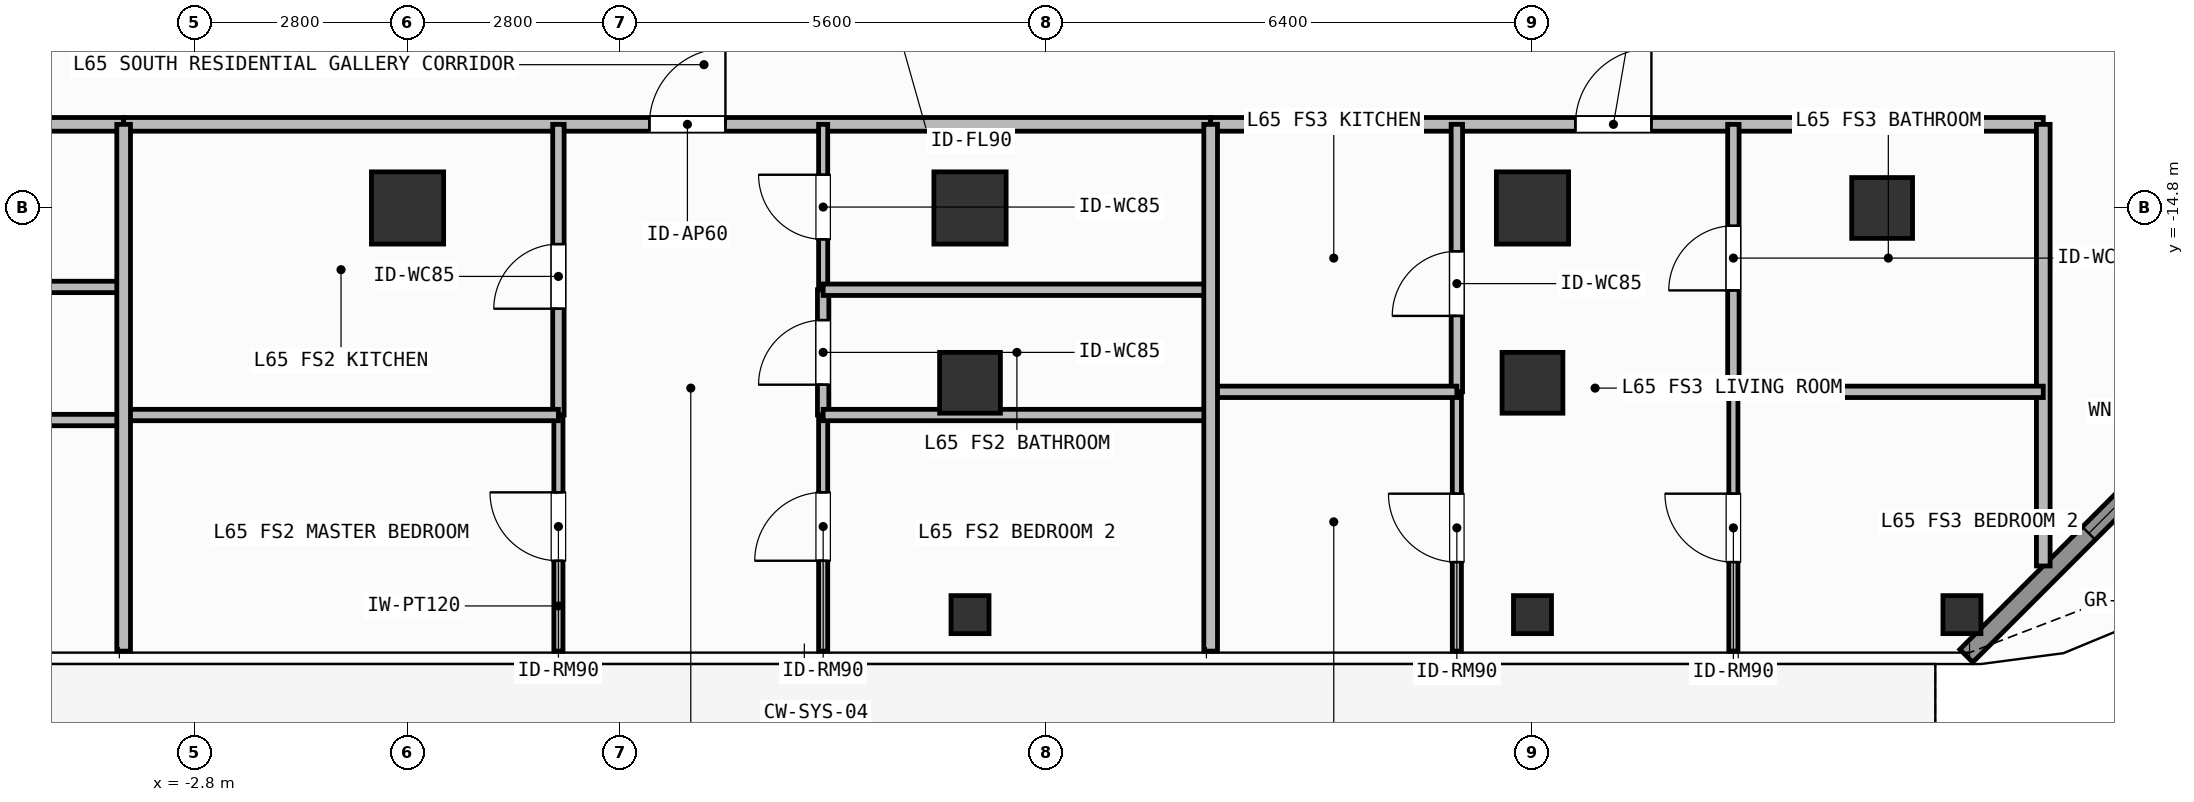
"""IFC4 building model, lengths in metres.
Left out: names, types, materials, properties, quantities, classifications, styles, units other than length and angle.
Written with IfcOpenShell. Run it as: python <this file> out.ifc"""

import sys

from ifc_helpers import new_model, si_unit, direction, frame, frame_2d, origin, origin_2d, place, context, subcontext, project, spatial, rectangle, hollow_rectangle, extrude, element, fill, save


model = new_model("IFC4")
c1 = context("Model", 3, precision=1e-05, world=origin(), true_north=direction((0.0, 1.0)))
c2 = subcontext(c1, "Body", "Model", "MODEL_VIEW")
j1 = project(units=[si_unit("LENGTHUNIT", "METRE"), si_unit("PLANEANGLEUNIT", "RADIAN")], contexts=[c1])
p1 = place(None, origin())
s1 = spatial("IfcSite", under=j1, at=p1, CompositionType="ELEMENT")
p2 = place(p1, origin())
s2 = spatial("IfcBuilding", under=s1, at=p2, CompositionType="ELEMENT")
p3 = place(p2, frame((0.0, 0.0, 266.4)))
s3 = spatial("IfcBuildingStorey", under=s2, at=p3, CompositionType="ELEMENT", Elevation=266.4)
for number, where, z_axis, x_axis in (
    (1, (0.0, -14.8, 0.0), (0.0, 0.0, 1.0), (1.0, 0.0, 0.0)),
    (2, (7.4, -14.8, 0.0), (0.0, 0.0, 1.0), (1.0, 0.0, 0.0)),
    (3, (14.8, -14.8, 0.0), (0.0, 0.0, 1.0), (1.0, 0.0, 0.0)),
):
    element("IfcColumn", number, at=place(p3, frame(where, z_axis=z_axis, x_axis=x_axis)), inside=s3, PredefinedType="COLUMN", context=c2, shape_type="SweptSolid", body=[
        extrude(rectangle(XDim=0.95, YDim=0.95, at=origin_2d()), origin(), (0.0, 0.0, 1.0), 3.9),
    ])
for number, where, z_axis, x_axis in (
    (4, (19.4, -14.8, 0.0), (0.0, 0.0, 1.0), (1.0, 0.0, 0.0)),
    (5, (7.4, -17.1, 0.0), (0.0, 0.0, 1.0), (1.0, 0.0, 0.0)),
    (6, (14.8, -17.1, 0.0), (0.0, 0.0, 1.0), (1.0, 0.0, 0.0)),
):
    element("IfcColumn", number, at=place(p3, frame(where, z_axis=z_axis, x_axis=x_axis)), inside=s3, PredefinedType="COLUMN", context=c2, shape_type="SweptSolid", body=[
        extrude(hollow_rectangle(XDim=0.8, YDim=0.8, WallThickness=0.036, at=origin_2d()), origin(), (0.0, 0.0, 1.0), 3.9),
    ])
for number, where, z_axis, x_axis in (
    (7, (20.45, -20.15, 0.0), (0.0, 0.0, 1.0), (1.0, 0.0, 0.0)),
    (8, (7.4, -20.15, 0.0), (0.0, 0.0, 1.0), (1.0, 0.0, 0.0)),
    (9, (14.8, -20.15, 0.0), (0.0, 0.0, 1.0), (1.0, 0.0, 0.0)),
):
    element("IfcColumn", number, at=place(p3, frame(where, z_axis=z_axis, x_axis=x_axis)), inside=s3, PredefinedType="COLUMN", context=c2, shape_type="SweptSolid", body=[
        extrude(hollow_rectangle(XDim=0.5, YDim=0.5, WallThickness=0.025, at=origin_2d()), origin(), (0.0, 0.0, 1.0), 3.9),
    ])
p4 = place(p3, frame((24.792, -16.408, 0.0), z_axis=(0.0, 0.0, 1.0), x_axis=(-0.707126925818, -0.707086635981, 0.0)))
e10 = element("IfcWall", 10, at=p4, inside=s3, PredefinedType="SOLIDWALL", context=c2, shape_type="SweptSolid", body=[
    extrude(rectangle(XDim=6.06, YDim=0.24, at=frame_2d((3.03, 0.0))), origin(), (0.0, 0.0, 1.0), 3.68),
])
p5 = place(p4, frame((2.28, 0.0, 0.8)))
e11 = element("IfcOpeningElement", 11, at=p5, cuts=e10, PredefinedType="OPENING", context=c2, shape_type="SweptSolid", body=[
    extrude(rectangle(XDim=1.5, YDim=1.85, at=frame_2d((0.75, 0.925))), frame((0.0, 0.13, 0.0), z_axis=(0.0, -1.0, 0.0), x_axis=(1.0, 0.0, 0.0)), (0.0, 0.0, 1.0), 0.26),
])
p6 = place(p3, frame((-13.72, -13.7, 0.0), z_axis=(0.0, 0.0, 1.0), x_axis=(1.0, 0.0, 0.0)))
e12 = element("IfcWall", 12, at=p6, inside=s3, PredefinedType="PARTITIONING", context=c2, shape_type="SweptSolid", body=[
    extrude(rectangle(XDim=9.985, YDim=0.18, at=frame_2d((4.992, 0.0))), origin(), (0.0, 0.0, 1.0), 3.68),
])
p7 = place(p6, frame((2.105, 0.0, 0.0)))
e13 = element("IfcOpeningElement", 13, at=p7, cuts=e12, PredefinedType="OPENING", context=c2, shape_type="SweptSolid", body=[
    extrude(rectangle(XDim=1.0, YDim=2.2, at=frame_2d((0.5, 1.1))), frame((0.0, 0.1, 0.0), z_axis=(0.0, -1.0, 0.0), x_axis=(1.0, 0.0, 0.0)), (0.0, 0.0, 1.0), 0.2),
])
p8 = place(p3, frame((-3.735, -13.7, 0.0), z_axis=(0.0, 0.0, 1.0), x_axis=(1.0, 0.0, 0.0)))
e14 = element("IfcWall", 14, at=p8, inside=s3, PredefinedType="PARTITIONING", context=c2, shape_type="SweptSolid", body=[
    extrude(rectangle(XDim=14.301, YDim=0.18, at=frame_2d((7.15, 0.0))), origin(), (0.0, 0.0, 1.0), 3.68),
])
p9 = place(p8, frame((6.917, 0.0, 0.0)))
e15 = element("IfcOpeningElement", 15, at=p9, cuts=e14, PredefinedType="OPENING", context=c2, shape_type="SweptSolid", body=[
    extrude(rectangle(XDim=1.0, YDim=2.2, at=frame_2d((0.5, 1.1))), frame((0.0, 0.1, 0.0), z_axis=(0.0, -1.0, 0.0), x_axis=(1.0, 0.0, 0.0)), (0.0, 0.0, 1.0), 0.2),
])
p10 = place(p3, frame((1.985, -17.524, 0.0), z_axis=(0.0, 0.0, 1.0), x_axis=(0.0, 1.0, 0.0)))
e16 = element("IfcWall", 16, at=p10, inside=s3, PredefinedType="PARTITIONING", context=c2, shape_type="SweptSolid", body=[
    extrude(rectangle(XDim=3.824, YDim=0.15, at=frame_2d((1.912, 0.0))), origin(), (0.0, 0.0, 1.0), 3.68),
])
p11 = place(p10, frame((1.398, 0.0, 0.0)))
e17 = element("IfcOpeningElement", 17, at=p11, cuts=e16, PredefinedType="OPENING", context=c2, shape_type="SweptSolid", body=[
    extrude(rectangle(XDim=0.85, YDim=2.1, at=frame_2d((0.425, 1.05))), frame((0.0, 0.085, 0.0), z_axis=(0.0, -1.0, 0.0), x_axis=(1.0, 0.0, 0.0)), (0.0, 0.0, 1.0), 0.17),
])
p12 = place(p3, frame((1.985, -20.63, 0.0), z_axis=(0.0, 0.0, 1.0), x_axis=(0.0, 1.0, 0.0)))
e18 = element("IfcWall", 18, at=p12, inside=s3, PredefinedType="PARTITIONING", context=c2, shape_type="SweptSolid", body=[
    extrude(rectangle(XDim=3.106, YDim=0.12, at=frame_2d((1.553, 0.0))), origin(), (0.0, 0.0, 1.0), 3.68),
])
p13 = place(p12, frame((1.189, 0.0, 0.0)))
e19 = element("IfcOpeningElement", 19, at=p13, cuts=e18, PredefinedType="OPENING", context=c2, shape_type="SweptSolid", body=[
    extrude(rectangle(XDim=0.9, YDim=2.1, at=frame_2d((0.45, 1.05))), frame((0.0, 0.07, 0.0), z_axis=(0.0, -1.0, 0.0), x_axis=(1.0, 0.0, 0.0)), (0.0, 0.0, 1.0), 0.14),
])
p14 = place(p3, frame((5.468, -17.524, 0.0), z_axis=(0.0, 0.0, 1.0), x_axis=(0.0, 1.0, 0.0)))
e20 = element("IfcWall", 20, at=p14, inside=s3, PredefinedType="PARTITIONING", context=c2, shape_type="SweptSolid", body=[
    extrude(rectangle(XDim=1.648, YDim=0.15, at=frame_2d((0.824, 0.0))), origin(), (0.0, 0.0, 1.0), 3.68),
])
p15 = place(p14, frame((0.399, 0.0, 0.0)))
e21 = element("IfcOpeningElement", 21, at=p15, cuts=e20, PredefinedType="OPENING", context=c2, shape_type="SweptSolid", body=[
    extrude(rectangle(XDim=0.85, YDim=2.1, at=frame_2d((0.425, 1.05))), frame((0.0, 0.085, 0.0), z_axis=(0.0, -1.0, 0.0), x_axis=(1.0, 0.0, 0.0)), (0.0, 0.0, 1.0), 0.17),
])
p16 = place(p3, frame((5.468, -15.876, 0.0), z_axis=(0.0, 0.0, 1.0), x_axis=(0.0, 1.0, 0.0)))
e22 = element("IfcWall", 22, at=p16, inside=s3, PredefinedType="PARTITIONING", context=c2, shape_type="SweptSolid", body=[
    extrude(rectangle(XDim=2.176, YDim=0.12, at=frame_2d((1.088, 0.0))), origin(), (0.0, 0.0, 1.0), 3.68),
])
p17 = place(p16, frame((0.663, 0.0, 0.0)))
e23 = element("IfcOpeningElement", 23, at=p17, cuts=e22, PredefinedType="OPENING", context=c2, shape_type="SweptSolid", body=[
    extrude(rectangle(XDim=0.85, YDim=2.1, at=frame_2d((0.425, 1.05))), frame((0.0, 0.07, 0.0), z_axis=(0.0, -1.0, 0.0), x_axis=(1.0, 0.0, 0.0)), (0.0, 0.0, 1.0), 0.14),
])
p18 = place(p3, frame((5.468, -20.63, 0.0), z_axis=(0.0, 0.0, 1.0), x_axis=(0.0, 1.0, 0.0)))
e24 = element("IfcWall", 24, at=p18, inside=s3, PredefinedType="PARTITIONING", context=c2, shape_type="SweptSolid", body=[
    extrude(rectangle(XDim=3.106, YDim=0.12, at=frame_2d((1.553, 0.0))), origin(), (0.0, 0.0, 1.0), 3.68),
])
p19 = place(p18, frame((1.189, 0.0, 0.0)))
e25 = element("IfcOpeningElement", 25, at=p19, cuts=e24, PredefinedType="OPENING", context=c2, shape_type="SweptSolid", body=[
    extrude(rectangle(XDim=0.9, YDim=2.1, at=frame_2d((0.45, 1.05))), frame((0.0, 0.07, 0.0), z_axis=(0.0, -1.0, 0.0), x_axis=(1.0, 0.0, 0.0)), (0.0, 0.0, 1.0), 0.14),
])
p20 = place(p3, frame((10.566, -13.7, 0.0), z_axis=(0.0, 0.0, 1.0), x_axis=(1.0, 0.0, 0.0)))
e26 = element("IfcWall", 26, at=p20, inside=s3, PredefinedType="PARTITIONING", context=c2, shape_type="SweptSolid", body=[
    extrude(rectangle(XDim=10.954, YDim=0.18, at=frame_2d((5.477, 0.0))), origin(), (0.0, 0.0, 1.0), 3.68),
])
p21 = place(p20, frame((4.799, 0.0, 0.0)))
e27 = element("IfcOpeningElement", 27, at=p21, cuts=e26, PredefinedType="OPENING", context=c2, shape_type="SweptSolid", body=[
    extrude(rectangle(XDim=1.0, YDim=2.2, at=frame_2d((0.5, 1.1))), frame((0.0, 0.1, 0.0), z_axis=(0.0, -1.0, 0.0), x_axis=(1.0, 0.0, 0.0)), (0.0, 0.0, 1.0), 0.2),
])
p22 = place(p3, frame((13.805, -17.219, 0.0), z_axis=(0.0, 0.0, 1.0), x_axis=(0.0, 1.0, 0.0)))
e28 = element("IfcWall", 28, at=p22, inside=s3, PredefinedType="PARTITIONING", context=c2, shape_type="SweptSolid", body=[
    extrude(rectangle(XDim=3.519, YDim=0.15, at=frame_2d((1.76, 0.0))), origin(), (0.0, 0.0, 1.0), 3.68),
])
p23 = place(p22, frame((0.999, 0.0, 0.0)))
e29 = element("IfcOpeningElement", 29, at=p23, cuts=e28, PredefinedType="OPENING", context=c2, shape_type="SweptSolid", body=[
    extrude(rectangle(XDim=0.85, YDim=2.1, at=frame_2d((0.425, 1.05))), frame((0.0, 0.085, 0.0), z_axis=(0.0, -1.0, 0.0), x_axis=(1.0, 0.0, 0.0)), (0.0, 0.0, 1.0), 0.17),
])
p24 = place(p3, frame((13.805, -20.63, 0.0), z_axis=(0.0, 0.0, 1.0), x_axis=(0.0, 1.0, 0.0)))
e30 = element("IfcWall", 30, at=p24, inside=s3, PredefinedType="PARTITIONING", context=c2, shape_type="SweptSolid", body=[
    extrude(rectangle(XDim=3.411, YDim=0.12, at=frame_2d((1.706, 0.0))), origin(), (0.0, 0.0, 1.0), 3.68),
])
p25 = place(p24, frame((1.171, 0.0, 0.0)))
e31 = element("IfcOpeningElement", 31, at=p25, cuts=e30, PredefinedType="OPENING", context=c2, shape_type="SweptSolid", body=[
    extrude(rectangle(XDim=0.9, YDim=2.1, at=frame_2d((0.45, 1.05))), frame((0.0, 0.07, 0.0), z_axis=(0.0, -1.0, 0.0), x_axis=(1.0, 0.0, 0.0)), (0.0, 0.0, 1.0), 0.14),
])
p26 = place(p3, frame((17.443, -17.219, 0.0), z_axis=(0.0, 0.0, 1.0), x_axis=(0.0, 1.0, 0.0)))
e32 = element("IfcWall", 32, at=p26, inside=s3, PredefinedType="PARTITIONING", context=c2, shape_type="SweptSolid", body=[
    extrude(rectangle(XDim=3.519, YDim=0.15, at=frame_2d((1.76, 0.0))), origin(), (0.0, 0.0, 1.0), 3.68),
])
p27 = place(p26, frame((1.334, 0.0, 0.0)))
e33 = element("IfcOpeningElement", 33, at=p27, cuts=e32, PredefinedType="OPENING", context=c2, shape_type="SweptSolid", body=[
    extrude(rectangle(XDim=0.85, YDim=2.1, at=frame_2d((0.425, 1.05))), frame((0.0, 0.085, 0.0), z_axis=(0.0, -1.0, 0.0), x_axis=(1.0, 0.0, 0.0)), (0.0, 0.0, 1.0), 0.17),
])
p28 = place(p3, frame((17.443, -20.63, 0.0), z_axis=(0.0, 0.0, 1.0), x_axis=(0.0, 1.0, 0.0)))
e34 = element("IfcWall", 34, at=p28, inside=s3, PredefinedType="PARTITIONING", context=c2, shape_type="SweptSolid", body=[
    extrude(rectangle(XDim=3.411, YDim=0.12, at=frame_2d((1.706, 0.0))), origin(), (0.0, 0.0, 1.0), 3.68),
])
p29 = place(p28, frame((1.171, 0.0, 0.0)))
e35 = element("IfcOpeningElement", 35, at=p29, cuts=e34, PredefinedType="OPENING", context=c2, shape_type="SweptSolid", body=[
    extrude(rectangle(XDim=0.9, YDim=2.1, at=frame_2d((0.45, 1.05))), frame((0.0, 0.07, 0.0), z_axis=(0.0, -1.0, 0.0), x_axis=(1.0, 0.0, 0.0)), (0.0, 0.0, 1.0), 0.14),
])
p30 = place(p3, frame((21.52, -19.51, 0.0), z_axis=(0.0, 0.0, 1.0), x_axis=(0.0, 1.0, 0.0)))
e36 = element("IfcWall", 36, at=p30, inside=s3, PredefinedType="PARTITIONING", context=c2, shape_type="SweptSolid", body=[
    extrude(rectangle(XDim=5.81, YDim=0.18, at=frame_2d((2.905, 0.0))), origin(), (0.0, 0.0, 1.0), 3.68),
])
for number, where, z_axis, x_axis in (
    (37, (-9.327, -15.839, 0.0), (0.0, 0.0, 1.0), (1.0, 0.0, 0.0)),
    (38, (-9.327, -17.59, 0.0), (0.0, 0.0, 1.0), (1.0, 0.0, 0.0)),
):
    element("IfcWall", number, at=place(p3, frame(where, z_axis=z_axis, x_axis=x_axis)), inside=s3, PredefinedType="PARTITIONING", context=c2, shape_type="SweptSolid", body=[
        extrude(rectangle(XDim=5.592, YDim=0.15, at=frame_2d((2.796, 0.0))), origin(), (0.0, 0.0, 1.0), 3.68),
    ])
p31 = place(p3, frame((-3.735, -17.524, 0.0), z_axis=(0.0, 0.0, 1.0), x_axis=(1.0, 0.0, 0.0)))
e39 = element("IfcWall", 39, at=p31, inside=s3, PredefinedType="PARTITIONING", context=c2, shape_type="SweptSolid", body=[
    extrude(rectangle(XDim=5.72, YDim=0.15, at=frame_2d((2.86, 0.0))), origin(), (0.0, 0.0, 1.0), 3.68),
])
for number, where, z_axis, x_axis in (
    (40, (5.468, -15.876, 0.0), (0.0, 0.0, 1.0), (1.0, 0.0, 0.0)),
    (41, (5.468, -17.524, 0.0), (0.0, 0.0, 1.0), (1.0, 0.0, 0.0)),
):
    element("IfcWall", number, at=place(p3, frame(where, z_axis=z_axis, x_axis=x_axis)), inside=s3, PredefinedType="PARTITIONING", context=c2, shape_type="SweptSolid", body=[
        extrude(rectangle(XDim=5.098, YDim=0.15, at=frame_2d((2.549, 0.0))), origin(), (0.0, 0.0, 1.0), 3.68),
    ])
p32 = place(p3, frame((-3.735, -20.63, 0.0), z_axis=(0.0, 0.0, 1.0), x_axis=(0.0, 1.0, 0.0)))
e42 = element("IfcWall", 42, at=p32, inside=s3, PredefinedType="PARTITIONING", context=c2, shape_type="SweptSolid", body=[
    extrude(rectangle(XDim=6.93, YDim=0.18, at=frame_2d((3.465, 0.0))), origin(), (0.0, 0.0, 1.0), 3.68),
])
p33 = place(p3, frame((10.566, -17.219, 0.0), z_axis=(0.0, 0.0, 1.0), x_axis=(1.0, 0.0, 0.0)))
e43 = element("IfcWall", 43, at=p33, inside=s3, PredefinedType="PARTITIONING", context=c2, shape_type="SweptSolid", body=[
    extrude(rectangle(XDim=3.239, YDim=0.15, at=frame_2d((1.62, 0.0))), origin(), (0.0, 0.0, 1.0), 3.182),
])
p34 = place(p3, frame((17.443, -17.219, 0.0), z_axis=(0.0, 0.0, 1.0), x_axis=(1.0, 0.0, 0.0)))
e44 = element("IfcWall", 44, at=p34, inside=s3, PredefinedType="PARTITIONING", context=c2, shape_type="SweptSolid", body=[
    extrude(rectangle(XDim=4.077, YDim=0.15, at=frame_2d((2.039, 0.0))), origin(), (0.0, 0.0, 1.0), 3.68),
])
p35 = place(p3, frame((10.566, -20.63, 0.0), z_axis=(0.0, 0.0, 1.0), x_axis=(0.0, 1.0, 0.0)))
e45 = element("IfcWall", 45, at=p35, inside=s3, PredefinedType="PARTITIONING", context=c2, shape_type="SweptSolid", body=[
    extrude(rectangle(XDim=6.93, YDim=0.18, at=frame_2d((3.465, 0.0))), origin(), (0.0, 0.0, 1.0), 3.68),
])
p36 = place(p5, origin())
e46 = element("IfcWindow", 46, at=p36, inside=s3, PartitioningType="SINGLE_PANEL", PredefinedType="WINDOW", context=c2, shape_type="SweptSolid", body=[
    extrude(rectangle(XDim=1.5, YDim=1.85, at=frame_2d((0.75, 0.925))), frame((0.0, 0.03, 0.0), z_axis=(0.0, -1.0, 0.0), x_axis=(1.0, 0.0, 0.0)), (0.0, 0.0, 1.0), 0.06),
])
fill(e11, e46)
p37 = place(p9, origin())
e47 = element("IfcDoor", 47, at=p37, inside=s3, OperationType="SINGLE_SWING_RIGHT", PredefinedType="DOOR", context=c2, shape_type="SweptSolid", body=[
    extrude(rectangle(XDim=1.0, YDim=2.2, at=frame_2d((0.5, 1.1))), frame((0.0, 0.025, 0.0), z_axis=(0.0, -1.0, 0.0), x_axis=(1.0, 0.0, 0.0)), (0.0, 0.0, 1.0), 0.05),
])
fill(e15, e47)
p38 = place(p11, origin())
e48 = element("IfcDoor", 48, at=p38, inside=s3, OperationType="SINGLE_SWING_LEFT", PredefinedType="DOOR", context=c2, shape_type="SweptSolid", body=[
    extrude(rectangle(XDim=0.85, YDim=2.1, at=frame_2d((0.425, 1.05))), frame((0.0, 0.025, 0.0), z_axis=(0.0, -1.0, 0.0), x_axis=(1.0, 0.0, 0.0)), (0.0, 0.0, 1.0), 0.05),
])
fill(e17, e48)
p39 = place(p13, origin())
e49 = element("IfcDoor", 49, at=p39, inside=s3, OperationType="SINGLE_SWING_RIGHT", PredefinedType="DOOR", context=c2, shape_type="SweptSolid", body=[
    extrude(rectangle(XDim=0.9, YDim=2.1, at=frame_2d((0.45, 1.05))), frame((0.0, 0.025, 0.0), z_axis=(0.0, -1.0, 0.0), x_axis=(1.0, 0.0, 0.0)), (0.0, 0.0, 1.0), 0.05),
])
fill(e19, e49)
p40 = place(p15, origin())
e50 = element("IfcDoor", 50, at=p40, inside=s3, OperationType="SINGLE_SWING_LEFT", PredefinedType="DOOR", context=c2, shape_type="SweptSolid", body=[
    extrude(rectangle(XDim=0.85, YDim=2.1, at=frame_2d((0.425, 1.05))), frame((0.0, 0.025, 0.0), z_axis=(0.0, -1.0, 0.0), x_axis=(1.0, 0.0, 0.0)), (0.0, 0.0, 1.0), 0.05),
])
fill(e21, e50)
p41 = place(p17, origin())
e51 = element("IfcDoor", 51, at=p41, inside=s3, OperationType="SINGLE_SWING_RIGHT", PredefinedType="DOOR", context=c2, shape_type="SweptSolid", body=[
    extrude(rectangle(XDim=0.85, YDim=2.1, at=frame_2d((0.425, 1.05))), frame((0.0, 0.025, 0.0), z_axis=(0.0, -1.0, 0.0), x_axis=(1.0, 0.0, 0.0)), (0.0, 0.0, 1.0), 0.05),
])
fill(e23, e51)
p42 = place(p19, origin())
e52 = element("IfcDoor", 52, at=p42, inside=s3, OperationType="SINGLE_SWING_LEFT", PredefinedType="DOOR", context=c2, shape_type="SweptSolid", body=[
    extrude(rectangle(XDim=0.9, YDim=2.1, at=frame_2d((0.45, 1.05))), frame((0.0, 0.025, 0.0), z_axis=(0.0, -1.0, 0.0), x_axis=(1.0, 0.0, 0.0)), (0.0, 0.0, 1.0), 0.05),
])
fill(e25, e52)
p43 = place(p21, origin())
e53 = element("IfcDoor", 53, at=p43, inside=s3, OperationType="SINGLE_SWING_RIGHT", PredefinedType="DOOR", context=c2, shape_type="SweptSolid", body=[
    extrude(rectangle(XDim=1.0, YDim=2.2, at=frame_2d((0.5, 1.1))), frame((0.0, 0.025, 0.0), z_axis=(0.0, -1.0, 0.0), x_axis=(1.0, 0.0, 0.0)), (0.0, 0.0, 1.0), 0.05),
])
fill(e27, e53)
p44 = place(p23, origin())
e54 = element("IfcDoor", 54, at=p44, inside=s3, OperationType="SINGLE_SWING_LEFT", PredefinedType="DOOR", context=c2, shape_type="SweptSolid", body=[
    extrude(rectangle(XDim=0.85, YDim=2.1, at=frame_2d((0.425, 1.05))), frame((0.0, 0.025, 0.0), z_axis=(0.0, -1.0, 0.0), x_axis=(1.0, 0.0, 0.0)), (0.0, 0.0, 1.0), 0.05),
])
fill(e29, e54)
p45 = place(p25, origin())
e55 = element("IfcDoor", 55, at=p45, inside=s3, OperationType="SINGLE_SWING_RIGHT", PredefinedType="DOOR", context=c2, shape_type="SweptSolid", body=[
    extrude(rectangle(XDim=0.9, YDim=2.1, at=frame_2d((0.45, 1.05))), frame((0.0, 0.025, 0.0), z_axis=(0.0, -1.0, 0.0), x_axis=(1.0, 0.0, 0.0)), (0.0, 0.0, 1.0), 0.05),
])
fill(e31, e55)
p46 = place(p27, origin())
e56 = element("IfcDoor", 56, at=p46, inside=s3, OperationType="SINGLE_SWING_LEFT", PredefinedType="DOOR", context=c2, shape_type="SweptSolid", body=[
    extrude(rectangle(XDim=0.85, YDim=2.1, at=frame_2d((0.425, 1.05))), frame((0.0, 0.025, 0.0), z_axis=(0.0, -1.0, 0.0), x_axis=(1.0, 0.0, 0.0)), (0.0, 0.0, 1.0), 0.05),
])
fill(e33, e56)
p47 = place(p29, origin())
e57 = element("IfcDoor", 57, at=p47, inside=s3, OperationType="SINGLE_SWING_RIGHT", PredefinedType="DOOR", context=c2, shape_type="SweptSolid", body=[
    extrude(rectangle(XDim=0.9, YDim=2.1, at=frame_2d((0.45, 1.05))), frame((0.0, 0.025, 0.0), z_axis=(0.0, -1.0, 0.0), x_axis=(1.0, 0.0, 0.0)), (0.0, 0.0, 1.0), 0.05),
])
fill(e35, e57)
save(model, sys.argv[1])
